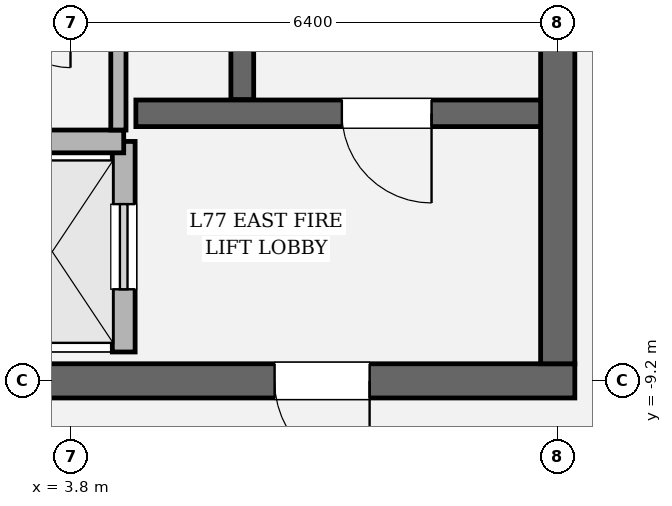
"""IFC4 building model, lengths in metres.
Left out: names, types, materials, properties, quantities, classifications, styles, units other than length and angle.
Written with IfcOpenShell. Run it as: python <this file> out.ifc"""

import sys

from ifc_helpers import new_model, si_unit, direction, frame, frame_2d, origin, place, context, subcontext, project, spatial, rectangle, extrude, element, fill, save


model = new_model("IFC4")
c1 = context("Model", 3, precision=1e-05, world=origin(), true_north=direction((0.0, 1.0)))
c2 = subcontext(c1, "Body", "Model", "MODEL_VIEW")
j1 = project(units=[si_unit("LENGTHUNIT", "METRE"), si_unit("PLANEANGLEUNIT", "RADIAN")], contexts=[c1])
p1 = place(None, origin())
s1 = spatial("IfcSite", under=j1, at=p1, CompositionType="ELEMENT")
p2 = place(p1, origin())
s2 = spatial("IfcBuilding", under=s1, at=p2, CompositionType="ELEMENT")
p3 = place(p2, frame((0.0, 0.0, 325.8)))
s3 = spatial("IfcBuildingStorey", under=s2, at=p3, CompositionType="ELEMENT", Elevation=325.8)
p4 = place(p3, frame((10.425, -9.2, 0.0), z_axis=(0.0, 0.0, 1.0), x_axis=(-1.0, 0.0, 0.0)))
e1 = element("IfcWall", 1, at=p4, inside=s3, PredefinedType="SHEAR", context=c2, shape_type="SweptSolid", body=[
    extrude(rectangle(XDim=20.85, YDim=0.45, at=frame_2d((10.425, 0.0))), origin(), (0.0, 0.0, 1.0), 4.2),
])
p5 = place(p4, frame((2.7, 0.0, 0.0)))
e2 = element("IfcOpeningElement", 2, at=p5, cuts=e1, PredefinedType="OPENING", context=c2, shape_type="SweptSolid", body=[
    extrude(rectangle(XDim=1.25, YDim=2.25, at=frame_2d((0.625, 1.125))), frame((0.0, 0.235, 0.0), z_axis=(0.0, -1.0, 0.0), x_axis=(1.0, 0.0, 0.0)), (0.0, 0.0, 1.0), 0.47),
])
p6 = place(p4, frame((16.9, 0.0, 0.0)))
e3 = element("IfcOpeningElement", 3, at=p6, cuts=e1, PredefinedType="OPENING", context=c2, shape_type="SweptSolid", body=[
    extrude(rectangle(XDim=1.25, YDim=2.25, at=frame_2d((0.625, 1.125))), frame((0.0, 0.235, 0.0), z_axis=(0.0, -1.0, 0.0), x_axis=(1.0, 0.0, 0.0)), (0.0, 0.0, 1.0), 0.47),
])
p7 = place(p3, frame((10.2, 8.975, 0.0), z_axis=(0.0, 0.0, 1.0), x_axis=(0.0, -1.0, 0.0)))
e4 = element("IfcWall", 4, at=p7, inside=s3, PredefinedType="SHEAR", context=c2, shape_type="SweptSolid", body=[
    extrude(rectangle(XDim=17.95, YDim=0.45, at=frame_2d((8.975, 0.0))), origin(), (0.0, 0.0, 1.0), 4.2),
])
p8 = place(p7, frame((4.005, 0.0, 0.0)))
e5 = element("IfcOpeningElement", 5, at=p8, cuts=e4, PredefinedType="OPENING", context=c2, shape_type="SweptSolid", body=[
    extrude(rectangle(XDim=1.18, YDim=2.2, at=frame_2d((0.59, 1.1))), frame((0.0, 0.235, 0.0), z_axis=(0.0, -1.0, 0.0), x_axis=(1.0, 0.0, 0.0)), (0.0, 0.0, 1.0), 0.47),
])
p9 = place(p3, frame((6.05, 3.45, 0.0), z_axis=(0.0, 0.0, 1.0), x_axis=(0.0, -1.0, 0.0)))
e6 = element("IfcWall", 6, at=p9, inside=s3, PredefinedType="SOLIDWALL", context=c2, shape_type="SweptSolid", body=[
    extrude(rectangle(XDim=8.95, YDim=0.3, at=frame_2d((4.475, 0.0))), origin(), (0.0, 0.0, 1.0), 4.2),
])
p10 = place(p3, frame((4.65, -5.68, 0.0), z_axis=(0.0, 0.0, 1.0), x_axis=(1.0, 0.0, 0.0)))
e7 = element("IfcWall", 7, at=p10, inside=s3, PredefinedType="SOLIDWALL", context=c2, shape_type="SweptSolid", body=[
    extrude(rectangle(XDim=5.325, YDim=0.35, at=frame_2d((2.663, 0.0))), origin(), (0.0, 0.0, 1.0), 4.2),
])
p11 = place(p10, frame((2.71, 0.0, 0.0)))
e8 = element("IfcOpeningElement", 8, at=p11, cuts=e7, PredefinedType="OPENING", context=c2, shape_type="SweptSolid", body=[
    extrude(rectangle(XDim=1.18, YDim=2.2, at=frame_2d((0.59, 1.1))), frame((0.0, 0.185, 0.0), z_axis=(0.0, -1.0, 0.0), x_axis=(1.0, 0.0, 0.0)), (0.0, 0.0, 1.0), 0.37),
])
p12 = place(p3, frame((4.49, -8.82, 0.0), z_axis=(0.0, 0.0, 1.0), x_axis=(0.0, 1.0, 0.0)))
e9 = element("IfcWall", 9, at=p12, inside=s3, PredefinedType="SOLIDWALL", context=c2, shape_type="SweptSolid", body=[
    extrude(rectangle(XDim=2.77, YDim=0.3, at=frame_2d((1.385, 0.0))), origin(), (0.0, 0.0, 1.0), 4.0),
])
p13 = place(p12, frame((0.825, 0.0, 0.0)))
e10 = element("IfcOpeningElement", 10, at=p13, cuts=e9, PredefinedType="OPENING", context=c2, shape_type="SweptSolid", body=[
    extrude(rectangle(XDim=1.12, YDim=2.25, at=frame_2d((0.56, 1.125))), frame((0.0, 0.16, 0.0), z_axis=(0.0, -1.0, 0.0), x_axis=(1.0, 0.0, 0.0)), (0.0, 0.0, 1.0), 0.32),
])
p14 = place(p3, frame((2.61, -6.05, 0.0), z_axis=(0.0, 0.0, 1.0), x_axis=(1.0, 0.0, 0.0)))
e11 = element("IfcWall", 11, at=p14, inside=s3, PredefinedType="SOLIDWALL", context=c2, shape_type="SweptSolid", body=[
    extrude(rectangle(XDim=1.88, YDim=0.3, at=frame_2d((0.94, 0.0))), origin(), (0.0, 0.0, 1.0), 4.0),
])
p15 = place(p3, frame((4.42, -5.9, 0.0), z_axis=(0.0, 0.0, 1.0), x_axis=(0.0, 1.0, 0.0)))
e12 = element("IfcWall", 12, at=p15, inside=s3, PredefinedType="SOLIDWALL", context=c2, shape_type="SweptSolid", body=[
    extrude(rectangle(XDim=1.74, YDim=0.2, at=frame_2d((0.87, 0.0))), origin(), (0.0, 0.0, 1.0), 4.0),
])
p16 = place(p11, origin())
e13 = element("IfcDoor", 13, at=p16, inside=s3, OperationType="SINGLE_SWING_RIGHT", PredefinedType="DOOR", context=c2, shape_type="SweptSolid", body=[
    extrude(rectangle(XDim=1.18, YDim=2.2, at=frame_2d((0.59, 1.1))), frame((0.0, 0.025, 0.0), z_axis=(0.0, -1.0, 0.0), x_axis=(1.0, 0.0, 0.0)), (0.0, 0.0, 1.0), 0.05),
])
fill(e8, e13)
p17 = place(p5, origin())
e14 = element("IfcDoor", 14, at=p17, inside=s3, OperationType="SINGLE_SWING_LEFT", PredefinedType="DOOR", context=c2, shape_type="SweptSolid", body=[
    extrude(rectangle(XDim=1.25, YDim=2.25, at=frame_2d((0.625, 1.125))), frame((0.0, 0.025, 0.0), z_axis=(0.0, -1.0, 0.0), x_axis=(1.0, 0.0, 0.0)), (0.0, 0.0, 1.0), 0.05),
])
fill(e2, e14)
p18 = place(p13, origin())
e15 = element("IfcDoor", 15, at=p18, inside=s3, OperationType="SLIDING_TO_RIGHT", PredefinedType="DOOR", context=c2, shape_type="SweptSolid", body=[
    extrude(rectangle(XDim=1.12, YDim=2.25, at=frame_2d((0.56, 1.125))), frame((0.0, 0.025, 0.0), z_axis=(0.0, -1.0, 0.0), x_axis=(1.0, 0.0, 0.0)), (0.0, 0.0, 1.0), 0.05),
])
fill(e10, e15)
save(model, sys.argv[1])
